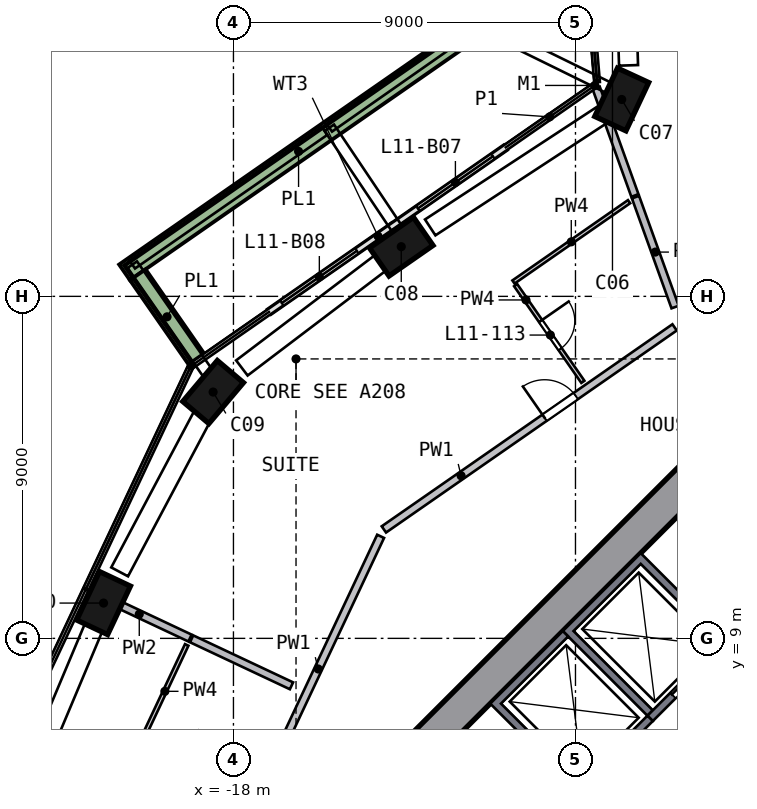
"""IFC4 building model, lengths in metres.
Left out: names, types, materials, properties, quantities, classifications, styles, units other than length and angle.
Written with IfcOpenShell. Run it as: python <this file> out.ifc"""

import sys

from ifc_helpers import new_model, si_unit, direction, frame, frame_2d, origin, origin_2d, place, context, subcontext, project, spatial, polyline, rectangle, outline, extrude, element, fill, save


model = new_model("IFC4")
c1 = context("Model", 3, precision=1e-05, world=origin(), true_north=direction((0.0, 1.0)))
c2 = subcontext(c1, "Body", "Model", "MODEL_VIEW")
j1 = project(units=[si_unit("LENGTHUNIT", "METRE"), si_unit("PLANEANGLEUNIT", "RADIAN")], contexts=[c1])
p1 = place(None, origin())
s1 = spatial("IfcSite", under=j1, at=p1, CompositionType="ELEMENT")
p2 = place(p1, origin())
s2 = spatial("IfcBuilding", under=s1, at=p2, CompositionType="ELEMENT")
p3 = place(p2, frame((0.0, 0.0, 53.0)))
s3 = spatial("IfcBuildingStorey", under=s2, at=p3, CompositionType="ELEMENT", Elevation=53.0)
p4 = place(p3, frame((-7.65, 23.226, 0.0), z_axis=(-0.110070907, -0.037323767, 0.9932227), x_axis=(0.417946894, 0.904913597, 0.080322951)))
e1 = element("IfcColumn", 1, at=p4, inside=s3, PredefinedType="COLUMN", context=c2, shape_type="SweptSolid", body=[
    extrude(rectangle(XDim=1.4, YDim=0.9, at=origin_2d()), origin(), (0.0, 0.0, 1.0), 3.212),
])
p5 = place(p3, frame((-13.474, 19.386, 0.0), z_axis=(-0.091640946, -0.064871143, 0.993676845), x_axis=(-0.815879269, -0.567217406, -0.112273915)))
e2 = element("IfcColumn", 2, at=p5, inside=s3, PredefinedType="COLUMN", context=c2, shape_type="SweptSolid", body=[
    extrude(rectangle(XDim=1.4, YDim=0.9, at=origin_2d()), origin(), (0.0, 0.0, 1.0), 3.21),
])
p6 = place(p3, frame((-18.447, 15.589, 0.0), z_axis=(-0.073442823, -0.088344265, 0.993378801), x_axis=(0.641502385, 0.758470218, 0.114880889)))
e3 = element("IfcColumn", 3, at=p6, inside=s3, PredefinedType="COLUMN", context=c2, shape_type="SweptSolid", body=[
    extrude(rectangle(XDim=1.4, YDim=0.9, at=origin_2d()), origin(), (0.0, 0.0, 1.0), 3.211),
])
p7 = place(p3, frame((-21.362, 10.052, 0.0), z_axis=(-0.046923296, -0.10198402, 0.993678753), x_axis=(-0.422986653, -0.899155521, -0.112257027)))
e4 = element("IfcColumn", 4, at=p7, inside=s3, PredefinedType="COLUMN", context=c2, shape_type="SweptSolid", body=[
    extrude(rectangle(XDim=1.4, YDim=0.9, at=origin_2d()), origin(), (0.0, 0.0, 1.0), 3.21),
])
p8 = place(p3, frame((-5.481, 13.682, 0.0), z_axis=(0.0, 0.0, 1.0), x_axis=(-0.707106781, -0.707106781, 0.0)))
e5 = element("IfcWall", 5, at=p8, inside=s3, PredefinedType="SHEAR", context=c2, shape_type="SweptSolid", body=[
    extrude(rectangle(XDim=11.598, YDim=0.9, at=frame_2d((5.799, 0.0))), origin(), (0.0, 0.0, 1.0), 3.5),
])
p9 = place(p3, frame((-10.846, 21.913, 0.0), z_axis=(0.0, 0.0, 1.0), x_axis=(-0.821158084, -0.570700799, 0.0)))
e6 = element("IfcWall", 6, at=p9, inside=s3, PredefinedType="SOLIDWALL", context=c2, shape_type="SweptSolid", body=[
    extrude(rectangle(XDim=3.6, YDim=0.15, at=frame_2d((1.8, 0.0))), origin(), (0.0, 0.0, 1.0), 2.425),
])
p10 = place(p9, frame((0.4, 0.0, 0.0)))
e7 = element("IfcOpeningElement", 7, at=p10, cuts=e6, PredefinedType="OPENING", context=c2, shape_type="SweptSolid", body=[
    extrude(rectangle(XDim=2.4, YDim=2.4, at=frame_2d((1.2, 1.2))), frame((0.0, 0.085, 0.0), z_axis=(0.0, -1.0, 0.0), x_axis=(1.0, 0.0, 0.0)), (0.0, 0.0, 1.0), 0.17),
])
p11 = place(p3, frame((-13.802, 19.858, 0.0), z_axis=(0.0, 0.0, 1.0), x_axis=(-0.821158921, -0.570699594, 0.0)))
e8 = element("IfcWall", 8, at=p11, inside=s3, PredefinedType="SOLIDWALL", context=c2, shape_type="SweptSolid", body=[
    extrude(rectangle(XDim=3.96, YDim=0.15, at=frame_2d((1.98, 0.0))), origin(), (0.0, 0.0, 1.0), 2.425),
])
p12 = place(p11, frame((1.16, 0.0, 0.0)))
e9 = element("IfcOpeningElement", 9, at=p12, cuts=e8, PredefinedType="OPENING", context=c2, shape_type="SweptSolid", body=[
    extrude(rectangle(XDim=2.4, YDim=2.4, at=frame_2d((1.2, 1.2))), frame((0.0, 0.085, 0.0), z_axis=(0.0, -1.0, 0.0), x_axis=(1.0, 0.0, 0.0)), (0.0, 0.0, 1.0), 0.17),
])
p13 = place(p3, frame((-11.708, 24.997, 0.0), z_axis=(0.0, 0.0, 1.0), x_axis=(-0.821157664, -0.570701402, 0.0)))
e10 = element("IfcWall", 10, at=p13, inside=s3, PredefinedType="SOLIDWALL", context=c2, shape_type="SweptSolid", body=[
    extrude(rectangle(XDim=11.153, YDim=0.5, at=frame_2d((5.576, 0.0))), origin(), (0.0, 0.0, 1.0), 0.7),
])
p14 = place(p3, frame((-20.518, 18.57, 0.0), z_axis=(0.0, 0.0, 1.0), x_axis=(0.570690734, -0.821165079, 0.0)))
e11 = element("IfcWall", 11, at=p14, inside=s3, PredefinedType="SOLIDWALL", context=c2, shape_type="SweptSolid", body=[
    extrude(rectangle(XDim=2.699, YDim=0.5, at=frame_2d((1.35, 0.0))), origin(), (0.0, 0.0, 1.0), 0.7),
])
p15 = place(p3, origin())
e12 = element("IfcWall", 12, at=p15, inside=s3, PredefinedType="SOLIDWALL", context=c2, shape_type="SweptSolid", body=[
    extrude(outline(polyline([(-9.334, 9.192), (-7.283, 11.243), (-5.056, 9.016), (-5.197, 8.874), (-7.283, 10.96), (-9.051, 9.192), (-6.965, 7.106), (-7.106, 6.965), (-9.334, 9.192)])), origin(), (0.0, 0.0, 1.0), 3.19),
])
p16 = place(p3, frame((-4.985, 8.945, 0.0), z_axis=(0.0, 0.0, 1.0), x_axis=(-0.707106781, -0.707106781, 0.0)))
e13 = element("IfcWall", 13, at=p16, inside=s3, PredefinedType="SOLIDWALL", context=c2, shape_type="SweptSolid", body=[
    extrude(rectangle(XDim=2.9, YDim=0.2, at=frame_2d((1.45, 0.0))), origin(), (0.0, 0.0, 1.0), 3.19),
])
p17 = place(p16, frame((0.85, 0.0, 0.0)))
e14 = element("IfcOpeningElement", 14, at=p17, cuts=e13, PredefinedType="OPENING", context=c2, shape_type="SweptSolid", body=[
    extrude(rectangle(XDim=1.2, YDim=2.1, at=frame_2d((0.6, 1.05))), frame((0.0, 0.11, 0.0), z_axis=(0.0, -1.0, 0.0), x_axis=(1.0, 0.0, 0.0)), (0.0, 0.0, 1.0), 0.22),
])
p18 = place(p3, origin())
e15 = element("IfcWall", 15, at=p18, inside=s3, PredefinedType="SOLIDWALL", context=c2, shape_type="SweptSolid", body=[
    extrude(outline(polyline([(-11.243, 7.283), (-9.334, 9.192), (-9.192, 9.051), (-10.96, 7.283), (-8.874, 5.197), (-9.016, 5.056), (-11.243, 7.283)])), origin(), (0.0, 0.0, 1.0), 3.19),
])
p19 = place(p3, frame((-7.036, 6.894, 0.0), z_axis=(0.0, 0.0, 1.0), x_axis=(-0.707106781, -0.707106781, 0.0)))
e16 = element("IfcWall", 16, at=p19, inside=s3, PredefinedType="SOLIDWALL", context=c2, shape_type="SweptSolid", body=[
    extrude(rectangle(XDim=2.7, YDim=0.2, at=frame_2d((1.35, 0.0))), origin(), (0.0, 0.0, 1.0), 3.19),
])
p20 = place(p19, frame((0.65, 0.0, 0.0)))
e17 = element("IfcOpeningElement", 17, at=p20, cuts=e16, PredefinedType="OPENING", context=c2, shape_type="SweptSolid", body=[
    extrude(rectangle(XDim=1.2, YDim=2.1, at=frame_2d((0.6, 1.05))), frame((0.0, 0.11, 0.0), z_axis=(0.0, -1.0, 0.0), x_axis=(1.0, 0.0, 0.0)), (0.0, 0.0, 1.0), 0.22),
])
p21 = place(p3, frame((-2.864, 6.823, 0.0), z_axis=(0.0, 0.0, 1.0), x_axis=(-0.707106781, -0.707106781, 0.0)))
e18 = element("IfcWall", 18, at=p21, inside=s3, PredefinedType="SOLIDWALL", context=c2, shape_type="SweptSolid", body=[
    extrude(rectangle(XDim=5.6, YDim=0.2, at=frame_2d((2.8, 0.0))), origin(), (0.0, 0.0, 1.0), 3.19),
])
p22 = place(p21, frame((2.2, 0.0, 0.0)))
e19 = element("IfcOpeningElement", 19, at=p22, cuts=e18, PredefinedType="OPENING", context=c2, shape_type="SweptSolid", body=[
    extrude(rectangle(XDim=1.2, YDim=2.1, at=frame_2d((0.6, 1.05))), frame((0.0, 0.11, 0.0), z_axis=(0.0, -1.0, 0.0), x_axis=(1.0, 0.0, 0.0)), (0.0, 0.0, 1.0), 0.22),
])
p23 = place(p3, frame((-18.009, 3.437, 0.0), z_axis=(0.0, 0.0, 1.0), x_axis=(0.42576737, 0.904832662, 0.0)))
e20 = element("IfcWall", 20, at=p23, inside=s3, PredefinedType="SOLIDWALL", context=c2, shape_type="SweptSolid", body=[
    extrude(rectangle(XDim=9.115, YDim=0.2, at=frame_2d((4.558, 0.0))), origin(), (0.0, 0.0, 1.0), 3.19),
])
p24 = place(p23, frame((0.2, 0.0, 0.0)))
e21 = element("IfcOpeningElement", 21, at=p24, cuts=e20, PredefinedType="OPENING", context=c2, shape_type="SweptSolid", body=[
    extrude(rectangle(XDim=1.0, YDim=2.1, at=frame_2d((0.5, 1.05))), frame((0.0, 0.11, 0.0), z_axis=(0.0, -1.0, 0.0), x_axis=(1.0, 0.0, 0.0)), (0.0, 0.0, 1.0), 0.22),
])
p25 = place(p3, frame((-14.042, 11.867, 0.0), z_axis=(0.0, 0.0, 1.0), x_axis=(0.821157773, 0.570701245, 0.0)))
e22 = element("IfcWall", 22, at=p25, inside=s3, PredefinedType="SOLIDWALL", context=c2, shape_type="SweptSolid", body=[
    extrude(rectangle(XDim=9.316, YDim=0.2, at=frame_2d((4.658, 0.0))), origin(), (0.0, 0.0, 1.0), 3.19),
])
p26 = place(p25, frame((5.15, 0.0, 0.0)))
e23 = element("IfcOpeningElement", 23, at=p26, cuts=e22, PredefinedType="OPENING", context=c2, shape_type="SweptSolid", body=[
    extrude(rectangle(XDim=1.0, YDim=2.1, at=frame_2d((0.5, 1.05))), frame((0.0, 0.11, 0.0), z_axis=(0.0, -1.0, 0.0), x_axis=(1.0, 0.0, 0.0)), (0.0, 0.0, 1.0), 0.22),
])
p27 = place(p3, frame((-19.143, 9.008, 0.0), z_axis=(0.0, 0.0, 1.0), x_axis=(-0.904794334, 0.425848814, 0.0)))
e24 = element("IfcWall", 24, at=p27, inside=s3, PredefinedType="SOLIDWALL", context=c2, shape_type="SweptSolid", body=[
    extrude(rectangle(XDim=2.952, YDim=0.2, at=frame_2d((1.476, 0.0))), origin(), (0.0, 0.0, 1.0), 3.19),
])
p28 = place(p3, frame((-16.473, 7.752, 0.0), z_axis=(0.0, 0.0, 1.0), x_axis=(-0.904862507, 0.425703938, 0.0)))
e25 = element("IfcWall", 25, at=p28, inside=s3, PredefinedType="SOLIDWALL", context=c2, shape_type="SweptSolid", body=[
    extrude(rectangle(XDim=2.905, YDim=0.2, at=frame_2d((1.452, 0.0))), origin(), (0.0, 0.0, 1.0), 3.19),
])
p29 = place(p3, frame((-7.436, 20.655, 0.0), z_axis=(0.0, 0.0, 1.0), x_axis=(-0.338707985, 0.940891546, 0.0)))
e26 = element("IfcWall", 26, at=p29, inside=s3, PredefinedType="SOLIDWALL", context=c2, shape_type="SweptSolid", body=[
    extrude(rectangle(XDim=3.011, YDim=0.2, at=frame_2d((1.506, 0.0))), origin(), (0.0, 0.0, 1.0), 2.69),
])
p30 = place(p3, frame((-6.379, 17.719, 0.0), z_axis=(0.0, 0.0, 1.0), x_axis=(-0.338744775, 0.940878301, 0.0)))
e27 = element("IfcWall", 27, at=p30, inside=s3, PredefinedType="SOLIDWALL", context=c2, shape_type="SweptSolid", body=[
    extrude(rectangle(XDim=3.075, YDim=0.2, at=frame_2d((1.537, 0.0))), origin(), (0.0, 0.0, 1.0), 3.19),
])
p31 = place(p3, frame((-20.379, 6.385, 0.0), z_axis=(0.0, 0.0, 1.0), x_axis=(0.425783973, 0.90482485, 0.0)))
e28 = element("IfcWall", 28, at=p31, inside=s3, PredefinedType="PARTITIONING", context=c2, shape_type="SweptSolid", body=[
    extrude(rectangle(XDim=2.7, YDim=0.1, at=frame_2d((1.35, 0.0))), origin(), (0.0, 0.0, 1.0), 3.19),
])
p32 = place(p3, frame((-10.574, 18.295, 0.0), z_axis=(0.0, 0.0, 1.0), x_axis=(0.57075293, -0.82112185, 0.0)))
e29 = element("IfcWall", 29, at=p32, inside=s3, PredefinedType="PARTITIONING", context=c2, shape_type="SweptSolid", body=[
    extrude(rectangle(XDim=3.1, YDim=0.1, at=frame_2d((1.55, 0.0))), origin(), (0.0, 0.0, 1.0), 3.19),
])
p33 = place(p32, frame((1.15, 0.0, 0.0)))
e30 = element("IfcOpeningElement", 30, at=p33, cuts=e29, PredefinedType="OPENING", context=c2, shape_type="SweptSolid", body=[
    extrude(rectangle(XDim=0.9, YDim=2.1, at=frame_2d((0.45, 1.05))), frame((0.0, 0.06, 0.0), z_axis=(0.0, -1.0, 0.0), x_axis=(1.0, 0.0, 0.0)), (0.0, 0.0, 1.0), 0.12),
])
p34 = place(p3, frame((-10.632, 18.378, 0.0), z_axis=(0.0, 0.0, 1.0), x_axis=(0.821134863, 0.570734209, 0.0)))
e31 = element("IfcWall", 31, at=p34, inside=s3, PredefinedType="PARTITIONING", context=c2, shape_type="SweptSolid", body=[
    extrude(rectangle(XDim=3.704, YDim=0.1, at=frame_2d((1.852, 0.0))), origin(), (0.0, 0.0, 1.0), 3.19),
])
p35 = place(p10, origin())
e32 = element("IfcDoor", 32, at=p35, inside=s3, OperationType="SLIDING_TO_RIGHT", PredefinedType="DOOR", context=c2, shape_type="SweptSolid", body=[
    extrude(rectangle(XDim=2.4, YDim=2.4, at=frame_2d((1.2, 1.2))), frame((0.0, 0.025, 0.0), z_axis=(0.0, -1.0, 0.0), x_axis=(1.0, 0.0, 0.0)), (0.0, 0.0, 1.0), 0.05),
])
fill(e7, e32)
p36 = place(p12, origin())
e33 = element("IfcDoor", 33, at=p36, inside=s3, OperationType="SLIDING_TO_LEFT", PredefinedType="DOOR", context=c2, shape_type="SweptSolid", body=[
    extrude(rectangle(XDim=2.4, YDim=2.4, at=frame_2d((1.2, 1.2))), frame((0.0, 0.025, 0.0), z_axis=(0.0, -1.0, 0.0), x_axis=(1.0, 0.0, 0.0)), (0.0, 0.0, 1.0), 0.05),
])
fill(e9, e33)
p37 = place(p17, origin())
e34 = element("IfcDoor", 34, at=p37, inside=s3, OperationType="DOUBLE_DOOR_SLIDING", PredefinedType="DOOR", context=c2, shape_type="SweptSolid", body=[
    extrude(rectangle(XDim=1.2, YDim=2.1, at=frame_2d((0.6, 1.05))), frame((0.0, 0.025, 0.0), z_axis=(0.0, -1.0, 0.0), x_axis=(1.0, 0.0, 0.0)), (0.0, 0.0, 1.0), 0.05),
])
fill(e14, e34)
p38 = place(p26, origin())
e35 = element("IfcDoor", 35, at=p38, inside=s3, OperationType="SINGLE_SWING_LEFT", PredefinedType="DOOR", context=c2, shape_type="SweptSolid", body=[
    extrude(rectangle(XDim=1.0, YDim=2.1, at=frame_2d((0.5, 1.05))), frame((0.0, 0.025, 0.0), z_axis=(0.0, -1.0, 0.0), x_axis=(1.0, 0.0, 0.0)), (0.0, 0.0, 1.0), 0.05),
])
fill(e23, e35)
p39 = place(p33, origin())
e36 = element("IfcDoor", 36, at=p39, inside=s3, OperationType="SINGLE_SWING_LEFT", PredefinedType="DOOR", context=c2, shape_type="SweptSolid", body=[
    extrude(rectangle(XDim=0.9, YDim=2.1, at=frame_2d((0.45, 1.05))), frame((0.0, 0.025, 0.0), z_axis=(0.0, -1.0, 0.0), x_axis=(1.0, 0.0, 0.0)), (0.0, 0.0, 1.0), 0.05),
])
fill(e30, e36)
save(model, sys.argv[1])
